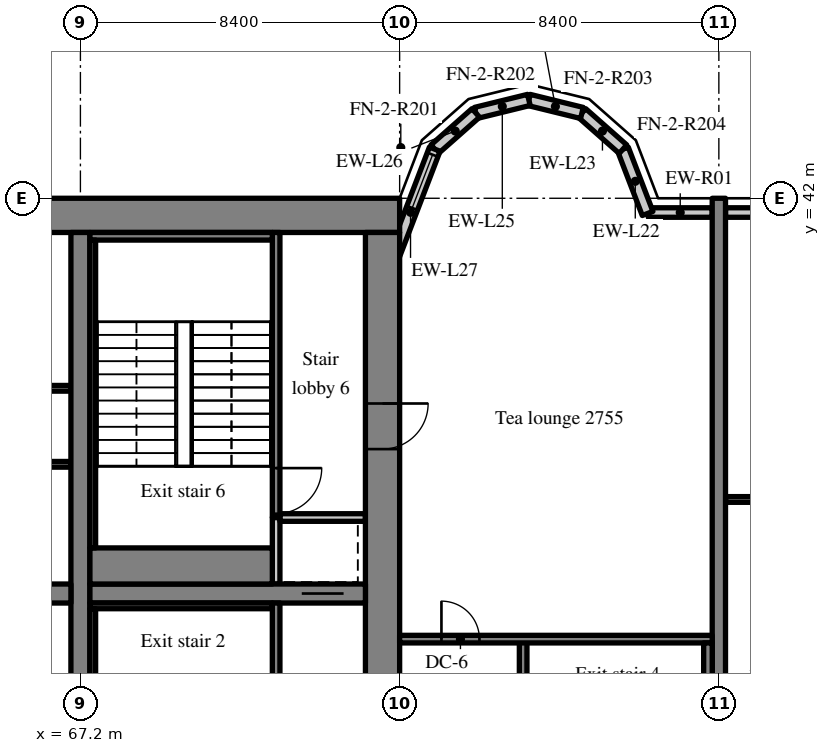
"""IFC4 building model, lengths in metres.
Left out: names, types, materials, properties, quantities, classifications, styles, units other than length and angle.
Written with IfcOpenShell. Run it as: python <this file> out.ifc"""

import sys

from ifc_helpers import new_model, si_unit, direction, frame, frame_2d, origin, place, context, subcontext, project, spatial, rectangle, extrude, source, transform, mapped, element, fill, save


model = new_model("IFC4")
c1 = context("Model", 3, precision=1e-05, world=origin(), true_north=direction((0.0, 1.0)))
c2 = subcontext(c1, "Body", "Model", "MODEL_VIEW")
j1 = project(units=[si_unit("LENGTHUNIT", "METRE"), si_unit("PLANEANGLEUNIT", "RADIAN")], contexts=[c1])
p1 = place(None, origin())
s1 = spatial("IfcSite", under=j1, at=p1, CompositionType="ELEMENT")
p2 = place(p1, origin())
s2 = spatial("IfcBuilding", under=s1, at=p2, CompositionType="ELEMENT")
p3 = place(p2, frame((0.0, 0.0, 114.2)))
s3 = spatial("IfcBuildingStorey", under=s2, at=p3, CompositionType="ELEMENT", Elevation=114.2)
m1 = source(origin(), c2, "Body", "SweptSolid", [
    extrude(rectangle(XDim=50.4, YDim=0.9, at=frame_2d((25.2, 0.0))), origin(), (0.0, 0.0, 1.0), 3.52),
])
p4 = place(p3, frame((25.2, 41.55, 0.0), z_axis=(0.0, 0.0, 1.0), x_axis=(1.0, 0.0, 0.0)))
e1 = element("IfcWall", 1, at=p4, inside=s3, PredefinedType="SHEAR", context=c2, shape_type="MappedRepresentation", body=[
    mapped(m1, transform((0.0, 0.0, 0.0), scale=1.0)),
])
m2 = source(origin(), c2, "Body", "SweptSolid", [
    extrude(rectangle(XDim=18.2, YDim=0.9, at=frame_2d((9.1, 0.0))), origin(), (0.0, 0.0, 1.0), 3.52),
])
p5 = place(p3, frame((75.15, 22.9, 0.0), z_axis=(0.0, 0.0, 1.0), x_axis=(0.0, 1.0, 0.0)))
e2 = element("IfcWall", 2, at=p5, inside=s3, PredefinedType="SHEAR", context=c2, shape_type="MappedRepresentation", body=[
    mapped(m2, transform((0.0, 0.0, 0.0), scale=1.0)),
])
m3 = source(origin(), c2, "Body", "SweptSolid", [
    extrude(rectangle(XDim=1.2, YDim=2.1, at=frame_2d((0.6, 1.05))), frame((0.0, 0.46, 0.0), z_axis=(0.0, -1.0, 0.0), x_axis=(1.0, 0.0, 0.0)), (0.0, 0.0, 1.0), 0.92),
])
p6 = place(p5, frame((12.5, 0.0, 0.0)))
e3 = element("IfcOpeningElement", 3, at=p6, cuts=e2, PredefinedType="OPENING", context=c2, shape_type="MappedRepresentation", body=[
    mapped(m3, transform((0.0, 0.0, 0.0), scale=1.0)),
])
m4 = source(origin(), c2, "Body", "SweptSolid", [
    extrude(rectangle(XDim=18.2, YDim=0.5, at=frame_2d((9.1, 0.0))), origin(), (0.0, 0.0, 1.0), 3.52),
])
p7 = place(p3, frame((67.2, 22.9, 0.0), z_axis=(0.0, 0.0, 1.0), x_axis=(0.0, 1.0, 0.0)))
e4 = element("IfcWall", 4, at=p7, inside=s3, PredefinedType="SHEAR", context=c2, shape_type="MappedRepresentation", body=[
    mapped(m4, transform((0.0, 0.0, 0.0), scale=1.0)),
])
m5 = source(origin(), c2, "Body", "SweptSolid", [
    extrude(rectangle(XDim=16.3, YDim=0.5, at=frame_2d((8.15, 0.0))), origin(), (0.0, 0.0, 1.0), 3.52),
])
p8 = place(p3, frame((50.65, 31.6, 0.0), z_axis=(0.0, 0.0, 1.0), x_axis=(1.0, 0.0, 0.0)))
e5 = element("IfcWall", 5, at=p8, inside=s3, PredefinedType="SHEAR", context=c2, shape_type="MappedRepresentation", body=[
    mapped(m5, transform((0.0, 0.0, 0.0), scale=1.0)),
])
m6 = source(origin(), c2, "Body", "SweptSolid", [
    extrude(rectangle(XDim=1.0, YDim=2.1, at=frame_2d((0.5, 1.05))), frame((0.0, 0.26, 0.0), z_axis=(0.0, -1.0, 0.0), x_axis=(1.0, 0.0, 0.0)), (0.0, 0.0, 1.0), 0.52),
])
p9 = place(p8, frame((0.575, 0.0, 0.0)))
e6 = element("IfcOpeningElement", 6, at=p9, cuts=e5, PredefinedType="OPENING", context=c2, shape_type="MappedRepresentation", body=[
    mapped(m6, transform((0.0, 0.0, 0.0), scale=1.0)),
])
m7 = source(origin(), c2, "Body", "SweptSolid", [
    extrude(rectangle(XDim=7.25, YDim=0.5, at=frame_2d((3.625, 0.0))), origin(), (0.0, 0.0, 1.0), 3.52),
])
p10 = place(p3, frame((67.45, 31.6, 0.0), z_axis=(0.0, 0.0, 1.0), x_axis=(1.0, 0.0, 0.0)))
e7 = element("IfcWall", 7, at=p10, inside=s3, PredefinedType="SHEAR", context=c2, shape_type="MappedRepresentation", body=[
    mapped(m7, transform((0.0, 0.0, 0.0), scale=1.0)),
])
m8 = source(origin(), c2, "Body", "SweptSolid", [
    extrude(rectangle(XDim=1.1, YDim=2.1, at=frame_2d((0.55, 1.05))), frame((0.0, 0.26, 0.0), z_axis=(0.0, -1.0, 0.0), x_axis=(1.0, 0.0, 0.0)), (0.0, 0.0, 1.0), 0.52),
])
p11 = place(p10, frame((5.575, 0.0, 0.0)))
e8 = element("IfcOpeningElement", 8, at=p11, cuts=e7, PredefinedType="OPENING", context=c2, shape_type="MappedRepresentation", body=[
    mapped(m8, transform((0.0, 0.0, 0.0), scale=1.0)),
])
m9 = source(origin(), c2, "Body", "SweptSolid", [
    extrude(rectangle(XDim=20.0, YDim=0.35, at=frame_2d((10.0, 0.0))), origin(), (0.0, 0.0, 1.0), 3.52),
])
p12 = place(p3, frame((84.0, 22.0, 0.0), z_axis=(0.0, 0.0, 1.0), x_axis=(0.0, 1.0, 0.0)))
e9 = element("IfcWall", 9, at=p12, inside=s3, PredefinedType="SHEAR", context=c2, shape_type="MappedRepresentation", body=[
    mapped(m9, transform((0.0, 0.0, 0.0), scale=1.0)),
])
m10 = source(origin(), c2, "Body", "SweptSolid", [
    extrude(rectangle(XDim=1.683, YDim=0.25, at=frame_2d((0.841, 0.0))), origin(), (0.0, 0.0, 1.0), 2.82),
])
p13 = place(p3, frame((83.825, 41.625, 0.0), z_axis=(0.0, 0.0, 1.0), x_axis=(-1.0, 0.0, 0.0)))
e10 = element("IfcWall", 10, at=p13, inside=s3, PredefinedType="SOLIDWALL", context=c2, shape_type="MappedRepresentation", body=[
    mapped(m10, transform((0.0, 0.0, 0.0), scale=1.0)),
])
m11 = source(origin(), c2, "Body", "SweptSolid", [
    extrude(rectangle(XDim=3.675, YDim=0.25, at=frame_2d((1.837, 0.0))), origin(), (0.0, 0.0, 1.0), 2.82),
])
p14 = place(p3, frame((87.85, 41.625, 0.0), z_axis=(0.0, 0.0, 1.0), x_axis=(-1.0, 0.0, 0.0)))
e11 = element("IfcWall", 11, at=p14, inside=s3, PredefinedType="SOLIDWALL", context=c2, shape_type="MappedRepresentation", body=[
    mapped(m11, transform((0.0, 0.0, 0.0), scale=1.0)),
])
m12 = source(origin(), c2, "Body", "SweptSolid", [
    extrude(rectangle(XDim=1.5, YDim=1.5, at=frame_2d((0.75, 0.75))), frame((0.0, 0.135, 0.0), z_axis=(0.0, -1.0, 0.0), x_axis=(1.0, 0.0, 0.0)), (0.0, 0.0, 1.0), 0.27),
])
p15 = place(p14, frame((1.087, 0.0, 0.9)))
e12 = element("IfcOpeningElement", 12, at=p15, cuts=e11, PredefinedType="OPENING", context=c2, shape_type="MappedRepresentation", body=[
    mapped(m12, transform((0.0, 0.0, 0.0), scale=1.0)),
])
m13 = source(origin(), c2, "Body", "SweptSolid", [
    extrude(rectangle(XDim=1.812, YDim=0.3, at=frame_2d((0.906, 0.0))), origin(), (0.0, 0.0, 1.0), 3.52),
])
p16 = place(p3, frame((82.125, 41.6, 0.0), z_axis=(0.0, 0.0, 1.0), x_axis=(-0.357877270961, 0.93376863244, 0.0)))
e13 = element("IfcWall", 13, at=p16, inside=s3, PredefinedType="SOLIDWALL", context=c2, shape_type="MappedRepresentation", body=[
    mapped(m13, transform((0.0, 0.0, 0.0), scale=1.0)),
])
m14 = source(origin(), c2, "Body", "SweptSolid", [
    extrude(rectangle(XDim=1.44, YDim=0.3, at=frame_2d((0.72, 0.0))), origin(), (0.0, 0.0, 1.0), 3.52),
])
p17 = place(p3, frame((81.477, 43.292, 0.0), z_axis=(0.0, 0.0, 1.0), x_axis=(-0.74957555648, 0.661918790432, 0.0)))
e14 = element("IfcWall", 14, at=p17, inside=s3, PredefinedType="SOLIDWALL", context=c2, shape_type="MappedRepresentation", body=[
    mapped(m14, transform((0.0, 0.0, 0.0), scale=1.0)),
])
m15 = source(origin(), c2, "Body", "SweptSolid", [
    extrude(rectangle(XDim=1.439, YDim=0.3, at=frame_2d((0.719, 0.0))), origin(), (0.0, 0.0, 1.0), 3.52),
])
for number, where, z_axis, x_axis in (
    (15, (80.397, 44.245, 0.0), (0.0, 0.0, 1.0), (-0.971, 0.238, 0.0)),
    (16, (79.0, 44.588, 0.0), (0.0, 0.0, 1.0), (-0.971, -0.238, 0.0)),
):
    element("IfcWall", number, at=place(p3, frame(where, z_axis=z_axis, x_axis=x_axis)), inside=s3, PredefinedType="SOLIDWALL", context=c2, shape_type="MappedRepresentation", body=[
        mapped(m15, transform((0.0, 0.0, 0.0), scale=1.0)),
    ])
p18 = place(p3, frame((77.603, 44.245, 0.0), z_axis=(0.0, 0.0, 1.0), x_axis=(-0.74957555648, -0.661918790432, 0.0)))
e17 = element("IfcWall", 17, at=p18, inside=s3, PredefinedType="SOLIDWALL", context=c2, shape_type="MappedRepresentation", body=[
    mapped(m14, transform((0.0, 0.0, 0.0), scale=1.0)),
])
m16 = source(origin(), c2, "Body", "SweptSolid", [
    extrude(rectangle(XDim=3.559, YDim=0.3, at=frame_2d((1.78, 0.0))), origin(), (0.0, 0.0, 1.0), 3.52),
])
p19 = place(p3, frame((76.523, 43.292, 0.0), z_axis=(0.0, 0.0, 1.0), x_axis=(-0.35779745313, -0.933799219604, 0.0)))
e18 = element("IfcWall", 18, at=p19, inside=s3, PredefinedType="SOLIDWALL", context=c2, shape_type="MappedRepresentation", body=[
    mapped(m16, transform((0.0, 0.0, 0.0), scale=1.0)),
])
m17 = source(origin(), c2, "Body", "SweptSolid", [
    extrude(rectangle(XDim=1.5, YDim=2.0, at=frame_2d((0.75, 1.0))), frame((0.0, 0.16, 0.0), z_axis=(0.0, -1.0, 0.0), x_axis=(1.0, 0.0, 0.0)), (0.0, 0.0, 1.0), 0.32),
])
p20 = place(p19, frame((0.156, 0.0, 0.9)))
e19 = element("IfcOpeningElement", 19, at=p20, cuts=e18, PredefinedType="OPENING", context=c2, shape_type="MappedRepresentation", body=[
    mapped(m17, transform((0.0, 0.0, 0.0), scale=1.0)),
])
m18 = source(origin(), c2, "Body", "SweptSolid", [
    extrude(rectangle(XDim=14.15, YDim=0.15, at=frame_2d((7.075, 0.0))), origin(), (0.0, 0.0, 1.0), 3.52),
])
p21 = place(p3, frame((66.95, 35.0, 0.0), z_axis=(0.0, 0.0, 1.0), x_axis=(-1.0, 0.0, 0.0)))
e20 = element("IfcWall", 20, at=p21, inside=s3, PredefinedType="PARTITIONING", context=c2, shape_type="MappedRepresentation", body=[
    mapped(m18, transform((0.0, 0.0, 0.0), scale=1.0)),
])
m19 = source(origin(), c2, "Body", "SweptSolid", [
    extrude(rectangle(XDim=0.9, YDim=2.1, at=frame_2d((0.45, 1.05))), frame((0.0, 0.085, 0.0), z_axis=(0.0, -1.0, 0.0), x_axis=(1.0, 0.0, 0.0)), (0.0, 0.0, 1.0), 0.17),
])
p22 = place(p21, frame((2.013, 0.0, 0.0)))
e21 = element("IfcOpeningElement", 21, at=p22, cuts=e20, PredefinedType="OPENING", context=c2, shape_type="MappedRepresentation", body=[
    mapped(m19, transform((0.0, 0.0, 0.0), scale=1.0)),
])
p23 = place(p21, frame((9.051, 0.0, 0.0)))
e22 = element("IfcOpeningElement", 22, at=p23, cuts=e20, PredefinedType="OPENING", context=c2, shape_type="MappedRepresentation", body=[
    mapped(m19, transform((0.0, 0.0, 0.0), scale=1.0)),
])
m20 = source(origin(), c2, "Body", "SweptSolid", [
    extrude(rectangle(XDim=16.3, YDim=0.15, at=frame_2d((8.15, 0.0))), origin(), (0.0, 0.0, 1.0), 3.52),
])
p24 = place(p3, frame((66.95, 37.0, 0.0), z_axis=(0.0, 0.0, 1.0), x_axis=(-1.0, 0.0, 0.0)))
e23 = element("IfcWall", 23, at=p24, inside=s3, PredefinedType="PARTITIONING", context=c2, shape_type="MappedRepresentation", body=[
    mapped(m20, transform((0.0, 0.0, 0.0), scale=1.0)),
])
p25 = place(p24, frame((1.588, 0.0, 0.0)))
e24 = element("IfcOpeningElement", 24, at=p25, cuts=e23, PredefinedType="OPENING", context=c2, shape_type="MappedRepresentation", body=[
    mapped(m19, transform((0.0, 0.0, 0.0), scale=1.0)),
])
p26 = place(p24, frame((7.293, 0.0, 0.0)))
e25 = element("IfcOpeningElement", 25, at=p26, cuts=e23, PredefinedType="OPENING", context=c2, shape_type="MappedRepresentation", body=[
    mapped(m19, transform((0.0, 0.0, 0.0), scale=1.0)),
])
p27 = place(p24, frame((12.183, 0.0, 0.0)))
e26 = element("IfcOpeningElement", 26, at=p27, cuts=e23, PredefinedType="OPENING", context=c2, shape_type="MappedRepresentation", body=[
    mapped(m19, transform((0.0, 0.0, 0.0), scale=1.0)),
])
p28 = place(p24, frame((14.627, 0.0, 0.0)))
e27 = element("IfcOpeningElement", 27, at=p28, cuts=e23, PredefinedType="OPENING", context=c2, shape_type="MappedRepresentation", body=[
    mapped(m19, transform((0.0, 0.0, 0.0), scale=1.0)),
])
m21 = source(origin(), c2, "Body", "SweptSolid", [
    extrude(rectangle(XDim=8.45, YDim=0.2, at=frame_2d((4.225, 0.0))), origin(), (0.0, 0.0, 1.0), 3.52),
])
p29 = place(p3, frame((72.35, 22.9, 0.0), z_axis=(0.0, 0.0, 1.0), x_axis=(0.0, 1.0, 0.0)))
e28 = element("IfcWall", 28, at=p29, inside=s3, PredefinedType="SOLIDWALL", context=c2, shape_type="MappedRepresentation", body=[
    mapped(m21, transform((0.0, 0.0, 0.0), scale=1.0)),
])
m22 = source(origin(), c2, "Body", "SweptSolid", [
    extrude(rectangle(XDim=1.2, YDim=2.1, at=frame_2d((0.6, 1.05))), frame((0.0, 0.11, 0.0), z_axis=(0.0, -1.0, 0.0), x_axis=(1.0, 0.0, 0.0)), (0.0, 0.0, 1.0), 0.22),
])
p30 = place(p29, frame((0.7, 0.0, 0.0)))
e29 = element("IfcOpeningElement", 29, at=p30, cuts=e28, PredefinedType="OPENING", context=c2, shape_type="MappedRepresentation", body=[
    mapped(m22, transform((0.0, 0.0, 0.0), scale=1.0)),
])
m23 = source(origin(), c2, "Body", "SweptSolid", [
    extrude(rectangle(XDim=1.75, YDim=0.2, at=frame_2d((0.875, 0.0))), origin(), (0.0, 0.0, 1.0), 3.52),
])
p31 = place(p3, frame((72.35, 31.85, 0.0), z_axis=(0.0, 0.0, 1.0), x_axis=(0.0, 1.0, 0.0)))
e30 = element("IfcWall", 30, at=p31, inside=s3, PredefinedType="SOLIDWALL", context=c2, shape_type="MappedRepresentation", body=[
    mapped(m23, transform((0.0, 0.0, 0.0), scale=1.0)),
])
m24 = source(origin(), c2, "Body", "SweptSolid", [
    extrude(rectangle(XDim=2.25, YDim=0.2, at=frame_2d((1.125, 0.0))), origin(), (0.0, 0.0, 1.0), 3.52),
])
p32 = place(p3, frame((72.45, 33.6, 0.0), z_axis=(0.0, 0.0, 1.0), x_axis=(1.0, 0.0, 0.0)))
e31 = element("IfcWall", 31, at=p32, inside=s3, PredefinedType="SOLIDWALL", context=c2, shape_type="MappedRepresentation", body=[
    mapped(m24, transform((0.0, 0.0, 0.0), scale=1.0)),
])
m25 = source(origin(), c2, "Body", "SweptSolid", [
    extrude(rectangle(XDim=7.5, YDim=0.2, at=frame_2d((3.75, 0.0))), origin(), (0.0, 0.0, 1.0), 3.52),
])
p33 = place(p3, frame((72.35, 33.6, 0.0), z_axis=(0.0, 0.0, 1.0), x_axis=(0.0, 1.0, 0.0)))
e32 = element("IfcWall", 32, at=p33, inside=s3, PredefinedType="SOLIDWALL", context=c2, shape_type="MappedRepresentation", body=[
    mapped(m25, transform((0.0, 0.0, 0.0), scale=1.0)),
])
p34 = place(p33, frame((0.1, 0.0, 0.0)))
e33 = element("IfcOpeningElement", 33, at=p34, cuts=e32, PredefinedType="OPENING", context=c2, shape_type="MappedRepresentation", body=[
    mapped(m22, transform((0.0, 0.0, 0.0), scale=1.0)),
])
m26 = source(origin(), c2, "Body", "SweptSolid", [
    extrude(rectangle(XDim=8.3, YDim=0.2, at=frame_2d((4.15, 0.0))), origin(), (0.0, 0.0, 1.0), 3.52),
])
p35 = place(p3, frame((78.85, 22.1, 0.0), z_axis=(0.0, 0.0, 1.0), x_axis=(0.0, 1.0, 0.0)))
e34 = element("IfcWall", 34, at=p35, inside=s3, PredefinedType="SOLIDWALL", context=c2, shape_type="MappedRepresentation", body=[
    mapped(m26, transform((0.0, 0.0, 0.0), scale=1.0)),
])
p36 = place(p35, frame((0.6, 0.0, 0.0)))
e35 = element("IfcOpeningElement", 35, at=p36, cuts=e34, PredefinedType="OPENING", context=c2, shape_type="MappedRepresentation", body=[
    mapped(m22, transform((0.0, 0.0, 0.0), scale=1.0)),
])
m27 = source(origin(), c2, "Body", "SweptSolid", [
    extrude(rectangle(XDim=8.225, YDim=0.2, at=frame_2d((4.112, 0.0))), origin(), (0.0, 0.0, 1.0), 3.52),
])
p37 = place(p3, frame((83.825, 30.4, 0.0), z_axis=(0.0, 0.0, 1.0), x_axis=(-1.0, 0.0, 0.0)))
e36 = element("IfcWall", 36, at=p37, inside=s3, PredefinedType="SOLIDWALL", context=c2, shape_type="MappedRepresentation", body=[
    mapped(m27, transform((0.0, 0.0, 0.0), scale=1.0)),
])
m28 = source(origin(), c2, "Body", "SweptSolid", [
    extrude(rectangle(XDim=1.0, YDim=2.1, at=frame_2d((0.5, 1.05))), frame((0.0, 0.11, 0.0), z_axis=(0.0, -1.0, 0.0), x_axis=(1.0, 0.0, 0.0)), (0.0, 0.0, 1.0), 0.22),
])
p38 = place(p37, frame((6.125, 0.0, 0.0)))
e37 = element("IfcOpeningElement", 37, at=p38, cuts=e36, PredefinedType="OPENING", context=c2, shape_type="MappedRepresentation", body=[
    mapped(m28, transform((0.0, 0.0, 0.0), scale=1.0)),
])
m29 = source(origin(), c2, "Body", "SweptSolid", [
    extrude(rectangle(XDim=4.8, YDim=0.15, at=frame_2d((2.4, 0.0))), origin(), (0.0, 0.0, 1.0), 3.52),
])
p39 = place(p3, frame((67.45, 31.275, 0.0), z_axis=(0.0, 0.0, 1.0), x_axis=(1.0, 0.0, 0.0)))
e38 = element("IfcWall", 38, at=p39, inside=s3, PredefinedType="SOLIDWALL", context=c2, shape_type="MappedRepresentation", body=[
    mapped(m29, transform((0.0, 0.0, 0.0), scale=1.0)),
])
m30 = source(origin(), c2, "Body", "SweptSolid", [
    extrude(rectangle(XDim=8.1, YDim=0.15, at=frame_2d((4.05, 0.0))), origin(), (0.0, 0.0, 1.0), 3.52),
])
p40 = place(p3, frame((67.525, 23.1, 0.0), z_axis=(0.0, 0.0, 1.0), x_axis=(0.0, 1.0, 0.0)))
e39 = element("IfcWall", 39, at=p40, inside=s3, PredefinedType="SOLIDWALL", context=c2, shape_type="MappedRepresentation", body=[
    mapped(m30, transform((0.0, 0.0, 0.0), scale=1.0)),
])
m31 = source(origin(), c2, "Body", "SweptSolid", [
    extrude(rectangle(XDim=4.8, YDim=0.2, at=frame_2d((2.4, 0.0))), origin(), (0.0, 0.0, 1.0), 3.52),
])
p41 = place(p3, frame((67.45, 41.0, 0.0), z_axis=(0.0, 0.0, 1.0), x_axis=(1.0, 0.0, 0.0)))
e40 = element("IfcWall", 40, at=p41, inside=s3, PredefinedType="SOLIDWALL", context=c2, shape_type="MappedRepresentation", body=[
    mapped(m31, transform((0.0, 0.0, 0.0), scale=1.0)),
])
m32 = source(origin(), c2, "Body", "SweptSolid", [
    extrude(rectangle(XDim=4.8, YDim=0.95, at=frame_2d((2.4, 0.0))), origin(), (0.0, 0.0, 1.0), 3.52),
])
p42 = place(p3, frame((67.45, 32.325, 0.0), z_axis=(0.0, 0.0, 1.0), x_axis=(1.0, 0.0, 0.0)))
e41 = element("IfcWall", 41, at=p42, inside=s3, PredefinedType="SOLIDWALL", context=c2, shape_type="MappedRepresentation", body=[
    mapped(m32, transform((0.0, 0.0, 0.0), scale=1.0)),
])
p43 = place(p3, frame((67.525, 32.8, 0.0), z_axis=(0.0, 0.0, 1.0), x_axis=(0.0, 1.0, 0.0)))
e42 = element("IfcWall", 42, at=p43, inside=s3, PredefinedType="SOLIDWALL", context=c2, shape_type="MappedRepresentation", body=[
    mapped(m30, transform((0.0, 0.0, 0.0), scale=1.0)),
])
m33 = source(origin(), c2, "Body", "SweptSolid", [
    extrude(rectangle(XDim=8.1, YDim=0.225, at=frame_2d((4.05, 0.0))), origin(), (0.0, 0.0, 1.0), 3.52),
])
p44 = place(p3, frame((83.713, 22.2, 0.0), z_axis=(0.0, 0.0, 1.0), x_axis=(0.0, 1.0, 0.0)))
e43 = element("IfcWall", 43, at=p44, inside=s3, PredefinedType="SOLIDWALL", context=c2, shape_type="MappedRepresentation", body=[
    mapped(m33, transform((0.0, 0.0, 0.0), scale=1.0)),
])
m34 = source(origin(), c2, "Body", "SweptSolid", [
    extrude(rectangle(XDim=8.05, YDim=0.15, at=frame_2d((4.025, 0.0))), origin(), (0.0, 0.0, 1.0), 3.52),
])
p45 = place(p3, frame((84.175, 34.075, 0.0), z_axis=(0.0, 0.0, 1.0), x_axis=(1.0, 0.0, 0.0)))
e44 = element("IfcWall", 44, at=p45, inside=s3, PredefinedType="PARTITIONING", context=c2, shape_type="MappedRepresentation", body=[
    mapped(m34, transform((0.0, 0.0, 0.0), scale=1.0)),
])
m35 = source(origin(), c2, "Body", "SweptSolid", [
    extrude(rectangle(XDim=1.0, YDim=2.1, at=frame_2d((0.5, 1.05))), frame((0.0, 0.085, 0.0), z_axis=(0.0, -1.0, 0.0), x_axis=(1.0, 0.0, 0.0)), (0.0, 0.0, 1.0), 0.17),
])
p46 = place(p45, frame((0.7, 0.0, 0.0)))
e45 = element("IfcOpeningElement", 45, at=p46, cuts=e44, PredefinedType="OPENING", context=c2, shape_type="MappedRepresentation", body=[
    mapped(m35, transform((0.0, 0.0, 0.0), scale=1.0)),
])
m36 = source(origin(), c2, "Body", "SweptSolid", [
    extrude(rectangle(XDim=1.5, YDim=2.0, at=frame_2d((0.75, 1.0))), frame((0.0, 0.03, 0.0), z_axis=(0.0, -1.0, 0.0), x_axis=(1.0, 0.0, 0.0)), (0.0, 0.0, 1.0), 0.06),
])
p47 = place(p20, origin())
e46 = element("IfcWindow", 46, at=p47, inside=s3, PartitioningType="SINGLE_PANEL", PredefinedType="WINDOW", context=c2, shape_type="MappedRepresentation", body=[
    mapped(m36, transform((0.0, 0.0, 0.0), scale=1.0)),
])
fill(e19, e46)
m37 = source(origin(), c2, "Body", "SweptSolid", [
    extrude(rectangle(XDim=1.1, YDim=2.1, at=frame_2d((0.55, 1.05))), frame((0.0, 0.025, 0.0), z_axis=(0.0, -1.0, 0.0), x_axis=(1.0, 0.0, 0.0)), (0.0, 0.0, 1.0), 0.05),
])
p48 = place(p11, origin())
e47 = element("IfcDoor", 47, at=p48, inside=s3, OperationType="SLIDING_TO_RIGHT", PredefinedType="DOOR", context=c2, shape_type="MappedRepresentation", body=[
    mapped(m37, transform((0.0, 0.0, 0.0), scale=1.0)),
])
fill(e8, e47)
m38 = source(origin(), c2, "Body", "SweptSolid", [
    extrude(rectangle(XDim=1.2, YDim=2.1, at=frame_2d((0.6, 1.05))), frame((0.0, 0.025, 0.0), z_axis=(0.0, -1.0, 0.0), x_axis=(1.0, 0.0, 0.0)), (0.0, 0.0, 1.0), 0.05),
])
p49 = place(p34, origin())
e48 = element("IfcDoor", 48, at=p49, inside=s3, OperationType="SINGLE_SWING_RIGHT", PredefinedType="DOOR", context=c2, shape_type="MappedRepresentation", body=[
    mapped(m38, transform((0.0, 0.0, 0.0), scale=1.0)),
])
fill(e33, e48)
p50 = place(p6, origin())
e49 = element("IfcDoor", 49, at=p50, inside=s3, OperationType="SINGLE_SWING_RIGHT", PredefinedType="DOOR", context=c2, shape_type="MappedRepresentation", body=[
    mapped(m38, transform((0.0, 0.0, 0.0), scale=1.0)),
])
fill(e3, e49)
m39 = source(origin(), c2, "Body", "SweptSolid", [
    extrude(rectangle(XDim=1.0, YDim=2.1, at=frame_2d((0.5, 1.05))), frame((0.0, 0.025, 0.0), z_axis=(0.0, -1.0, 0.0), x_axis=(1.0, 0.0, 0.0)), (0.0, 0.0, 1.0), 0.05),
])
p51 = place(p38, origin())
e50 = element("IfcDoor", 50, at=p51, inside=s3, OperationType="SINGLE_SWING_RIGHT", PredefinedType="DOOR", context=c2, shape_type="MappedRepresentation", body=[
    mapped(m39, transform((0.0, 0.0, 0.0), scale=1.0)),
])
fill(e37, e50)
save(model, sys.argv[1])
